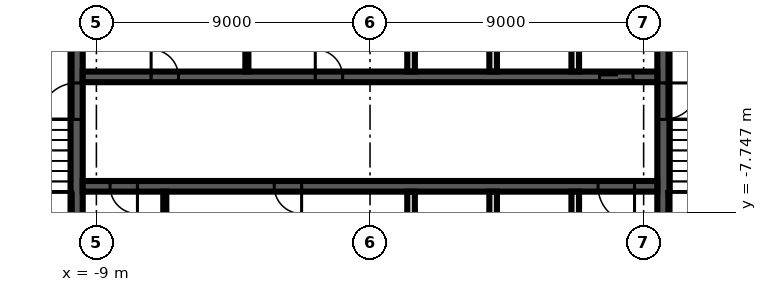
"""IFC4 building model, lengths in metres.
Left out: names, types, materials, properties, quantities, classifications, styles, units other than length and angle.
Written with IfcOpenShell. Run it as: python <this file> out.ifc"""

import sys

from ifc_helpers import new_model, si_unit, direction, frame, frame_2d, origin, place, context, subcontext, project, spatial, rectangle, extrude, element, fill, save


model = new_model("IFC4")
c1 = context("Model", 3, precision=1e-05, world=origin(), true_north=direction((0.0, 1.0)))
c2 = subcontext(c1, "Body", "Model", "MODEL_VIEW")
j1 = project(units=[si_unit("LENGTHUNIT", "METRE"), si_unit("PLANEANGLEUNIT", "RADIAN")], contexts=[c1])
p1 = place(None, origin())
s1 = spatial("IfcSite", under=j1, at=p1, CompositionType="ELEMENT")
p2 = place(p1, origin())
s2 = spatial("IfcBuilding", under=s1, at=p2, CompositionType="ELEMENT")
p3 = place(p2, frame((0.0, 0.0, 19.0)))
s3 = spatial("IfcBuildingStorey", under=s2, at=p3, CompositionType="ELEMENT", Elevation=19.0)
p4 = place(p3, frame((9.65, -2.3, 0.0), z_axis=(0.0, 0.0, 1.0), x_axis=(0.0, -1.0, 0.0)))
e1 = element("IfcWall", 1, at=p4, inside=s3, PredefinedType="SHEAR", context=c2, shape_type="SweptSolid", body=[
    extrude(rectangle(XDim=7.5, YDim=0.4, at=frame_2d((3.75, 0.0))), origin(), (0.0, 0.0, 1.0), 7.55),
])
p5 = place(p4, frame((1.2, 0.0, 0.0)))
e2 = element("IfcOpeningElement", 2, at=p5, cuts=e1, PredefinedType="OPENING", context=c2, shape_type="SweptSolid", body=[
    extrude(rectangle(XDim=1.2, YDim=2.1, at=frame_2d((0.6, 1.05))), frame((0.0, 0.21, 0.0), z_axis=(0.0, -1.0, 0.0), x_axis=(1.0, 0.0, 0.0)), (0.0, 0.0, 1.0), 0.42),
])
p6 = place(p3, frame((-9.65, -9.8, 0.0), z_axis=(0.0, 0.0, 1.0), x_axis=(0.0, 1.0, 0.0)))
e3 = element("IfcWall", 3, at=p6, inside=s3, PredefinedType="SHEAR", context=c2, shape_type="SweptSolid", body=[
    extrude(rectangle(XDim=7.5, YDim=0.4, at=frame_2d((3.75, 0.0))), origin(), (0.0, 0.0, 1.0), 7.55),
])
p7 = place(p6, frame((5.1, 0.0, 0.0)))
e4 = element("IfcOpeningElement", 4, at=p7, cuts=e3, PredefinedType="OPENING", context=c2, shape_type="SweptSolid", body=[
    extrude(rectangle(XDim=1.2, YDim=2.1, at=frame_2d((0.6, 1.05))), frame((0.0, 0.21, 0.0), z_axis=(0.0, -1.0, 0.0), x_axis=(1.0, 0.0, 0.0)), (0.0, 0.0, 1.0), 0.42),
])
p8 = place(p3, frame((-9.45, -3.3, 0.0), z_axis=(0.0, 0.0, 1.0), x_axis=(1.0, 0.0, 0.0)))
e5 = element("IfcWall", 5, at=p8, inside=s3, PredefinedType="SHEAR", context=c2, shape_type="SweptSolid", body=[
    extrude(rectangle(XDim=18.9, YDim=0.35, at=frame_2d((9.45, 0.0))), origin(), (0.0, 0.0, 1.0), 7.55),
])
p9 = place(p8, frame((17.0, 0.0, 0.0)))
e6 = element("IfcOpeningElement", 6, at=p9, cuts=e5, PredefinedType="OPENING", context=c2, shape_type="SweptSolid", body=[
    extrude(rectangle(XDim=1.1, YDim=2.1, at=frame_2d((0.55, 1.05))), frame((0.0, 0.185, 0.0), z_axis=(0.0, -1.0, 0.0), x_axis=(1.0, 0.0, 0.0)), (0.0, 0.0, 1.0), 0.37),
])
p10 = place(p8, frame((2.25, 0.0, 0.0)))
e7 = element("IfcOpeningElement", 7, at=p10, cuts=e5, PredefinedType="OPENING", context=c2, shape_type="SweptSolid", body=[
    extrude(rectangle(XDim=0.9, YDim=2.1, at=frame_2d((0.45, 1.05))), frame((0.0, 0.185, 0.0), z_axis=(0.0, -1.0, 0.0), x_axis=(1.0, 0.0, 0.0)), (0.0, 0.0, 1.0), 0.37),
])
p11 = place(p8, frame((7.65, 0.0, 0.0)))
e8 = element("IfcOpeningElement", 8, at=p11, cuts=e5, PredefinedType="OPENING", context=c2, shape_type="SweptSolid", body=[
    extrude(rectangle(XDim=0.9, YDim=2.1, at=frame_2d((0.45, 1.05))), frame((0.0, 0.185, 0.0), z_axis=(0.0, -1.0, 0.0), x_axis=(1.0, 0.0, 0.0)), (0.0, 0.0, 1.0), 0.37),
])
p12 = place(p3, frame((9.45, -6.9, 0.0), z_axis=(0.0, 0.0, 1.0), x_axis=(-1.0, 0.0, 0.0)))
e9 = element("IfcWall", 9, at=p12, inside=s3, PredefinedType="SHEAR", context=c2, shape_type="SweptSolid", body=[
    extrude(rectangle(XDim=18.9, YDim=0.35, at=frame_2d((9.45, 0.0))), origin(), (0.0, 0.0, 1.0), 7.55),
])
p13 = place(p12, frame((0.75, 0.0, 0.0)))
e10 = element("IfcOpeningElement", 10, at=p13, cuts=e9, PredefinedType="OPENING", context=c2, shape_type="SweptSolid", body=[
    extrude(rectangle(XDim=1.2, YDim=2.1, at=frame_2d((0.6, 1.05))), frame((0.0, 0.185, 0.0), z_axis=(0.0, -1.0, 0.0), x_axis=(1.0, 0.0, 0.0)), (0.0, 0.0, 1.0), 0.37),
])
p14 = place(p12, frame((17.1, 0.0, 0.0)))
e11 = element("IfcOpeningElement", 11, at=p14, cuts=e9, PredefinedType="OPENING", context=c2, shape_type="SweptSolid", body=[
    extrude(rectangle(XDim=0.9, YDim=2.1, at=frame_2d((0.45, 1.05))), frame((0.0, 0.185, 0.0), z_axis=(0.0, -1.0, 0.0), x_axis=(1.0, 0.0, 0.0)), (0.0, 0.0, 1.0), 0.37),
])
p15 = place(p12, frame((11.7, 0.0, 0.0)))
e12 = element("IfcOpeningElement", 12, at=p15, cuts=e9, PredefinedType="OPENING", context=c2, shape_type="SweptSolid", body=[
    extrude(rectangle(XDim=0.9, YDim=2.1, at=frame_2d((0.45, 1.05))), frame((0.0, 0.185, 0.0), z_axis=(0.0, -1.0, 0.0), x_axis=(1.0, 0.0, 0.0)), (0.0, 0.0, 1.0), 0.37),
])
for number, where, z_axis, x_axis in (
    (13, (6.75, -9.8, 0.0), (0.0, 0.0, 1.0), (0.0, 1.0, 0.0)),
    (14, (6.75, -3.125, 0.0), (0.0, 0.0, 1.0), (0.0, 1.0, 0.0)),
    (15, (4.05, -9.8, 0.0), (0.0, 0.0, 1.0), (0.0, 1.0, 0.0)),
    (16, (4.05, -3.125, 0.0), (0.0, 0.0, 1.0), (0.0, 1.0, 0.0)),
    (17, (1.35, -9.8, 0.0), (0.0, 0.0, 1.0), (0.0, 1.0, 0.0)),
    (18, (1.35, -3.125, 0.0), (0.0, 0.0, 1.0), (0.0, 1.0, 0.0)),
):
    element("IfcWall", number, at=place(p3, frame(where, z_axis=z_axis, x_axis=x_axis)), inside=s3, PredefinedType="SOLIDWALL", context=c2, shape_type="SweptSolid", body=[
        extrude(rectangle(XDim=2.725, YDim=0.25, at=frame_2d((1.363, 0.0))), origin(), (0.0, 0.0, 1.0), 7.55),
    ])
for number, where, z_axis, x_axis in (
    (19, (-4.05, -3.125, 0.0), (0.0, 0.0, 1.0), (0.0, 1.0, 0.0)),
    (20, (-6.75, -9.8, 0.0), (0.0, 0.0, 1.0), (0.0, 1.0, 0.0)),
):
    element("IfcWall", number, at=place(p3, frame(where, z_axis=z_axis, x_axis=x_axis)), inside=s3, PredefinedType="PARTITIONING", context=c2, shape_type="SweptSolid", body=[
        extrude(rectangle(XDim=2.725, YDim=0.1, at=frame_2d((1.363, 0.0))), origin(), (0.0, 0.0, 1.0), 7.55),
    ])
p16 = place(p9, origin())
e21 = element("IfcDoor", 21, at=p16, inside=s3, OperationType="DOUBLE_DOOR_SLIDING", PredefinedType="DOOR", context=c2, shape_type="SweptSolid", body=[
    extrude(rectangle(XDim=1.1, YDim=2.1, at=frame_2d((0.55, 1.05))), frame((0.0, 0.025, 0.0), z_axis=(0.0, -1.0, 0.0), x_axis=(1.0, 0.0, 0.0)), (0.0, 0.0, 1.0), 0.05),
])
fill(e6, e21)
p17 = place(p13, origin())
e22 = element("IfcDoor", 22, at=p17, inside=s3, OperationType="SINGLE_SWING_LEFT", PredefinedType="DOOR", context=c2, shape_type="SweptSolid", body=[
    extrude(rectangle(XDim=1.2, YDim=2.1, at=frame_2d((0.6, 1.05))), frame((0.0, 0.025, 0.0), z_axis=(0.0, -1.0, 0.0), x_axis=(1.0, 0.0, 0.0)), (0.0, 0.0, 1.0), 0.05),
])
fill(e10, e22)
p18 = place(p10, origin())
e23 = element("IfcDoor", 23, at=p18, inside=s3, OperationType="SINGLE_SWING_RIGHT", PredefinedType="DOOR", context=c2, shape_type="SweptSolid", body=[
    extrude(rectangle(XDim=0.9, YDim=2.1, at=frame_2d((0.45, 1.05))), frame((0.0, 0.025, 0.0), z_axis=(0.0, -1.0, 0.0), x_axis=(1.0, 0.0, 0.0)), (0.0, 0.0, 1.0), 0.05),
])
fill(e7, e23)
p19 = place(p11, origin())
e24 = element("IfcDoor", 24, at=p19, inside=s3, OperationType="SINGLE_SWING_LEFT", PredefinedType="DOOR", context=c2, shape_type="SweptSolid", body=[
    extrude(rectangle(XDim=0.9, YDim=2.1, at=frame_2d((0.45, 1.05))), frame((0.0, 0.025, 0.0), z_axis=(0.0, -1.0, 0.0), x_axis=(1.0, 0.0, 0.0)), (0.0, 0.0, 1.0), 0.05),
])
fill(e8, e24)
p20 = place(p14, origin())
e25 = element("IfcDoor", 25, at=p20, inside=s3, OperationType="SINGLE_SWING_RIGHT", PredefinedType="DOOR", context=c2, shape_type="SweptSolid", body=[
    extrude(rectangle(XDim=0.9, YDim=2.1, at=frame_2d((0.45, 1.05))), frame((0.0, 0.025, 0.0), z_axis=(0.0, -1.0, 0.0), x_axis=(1.0, 0.0, 0.0)), (0.0, 0.0, 1.0), 0.05),
])
fill(e11, e25)
p21 = place(p15, origin())
e26 = element("IfcDoor", 26, at=p21, inside=s3, OperationType="SINGLE_SWING_LEFT", PredefinedType="DOOR", context=c2, shape_type="SweptSolid", body=[
    extrude(rectangle(XDim=0.9, YDim=2.1, at=frame_2d((0.45, 1.05))), frame((0.0, 0.025, 0.0), z_axis=(0.0, -1.0, 0.0), x_axis=(1.0, 0.0, 0.0)), (0.0, 0.0, 1.0), 0.05),
])
fill(e12, e26)
p22 = place(p5, origin())
e27 = element("IfcDoor", 27, at=p22, inside=s3, OperationType="SINGLE_SWING_RIGHT", PredefinedType="DOOR", context=c2, shape_type="SweptSolid", body=[
    extrude(rectangle(XDim=1.2, YDim=2.1, at=frame_2d((0.6, 1.05))), frame((0.0, 0.025, 0.0), z_axis=(0.0, -1.0, 0.0), x_axis=(1.0, 0.0, 0.0)), (0.0, 0.0, 1.0), 0.05),
])
fill(e2, e27)
p23 = place(p7, origin())
e28 = element("IfcDoor", 28, at=p23, inside=s3, OperationType="SINGLE_SWING_LEFT", PredefinedType="DOOR", context=c2, shape_type="SweptSolid", body=[
    extrude(rectangle(XDim=1.2, YDim=2.1, at=frame_2d((0.6, 1.05))), frame((0.0, 0.025, 0.0), z_axis=(0.0, -1.0, 0.0), x_axis=(1.0, 0.0, 0.0)), (0.0, 0.0, 1.0), 0.05),
])
fill(e4, e28)
save(model, sys.argv[1])
